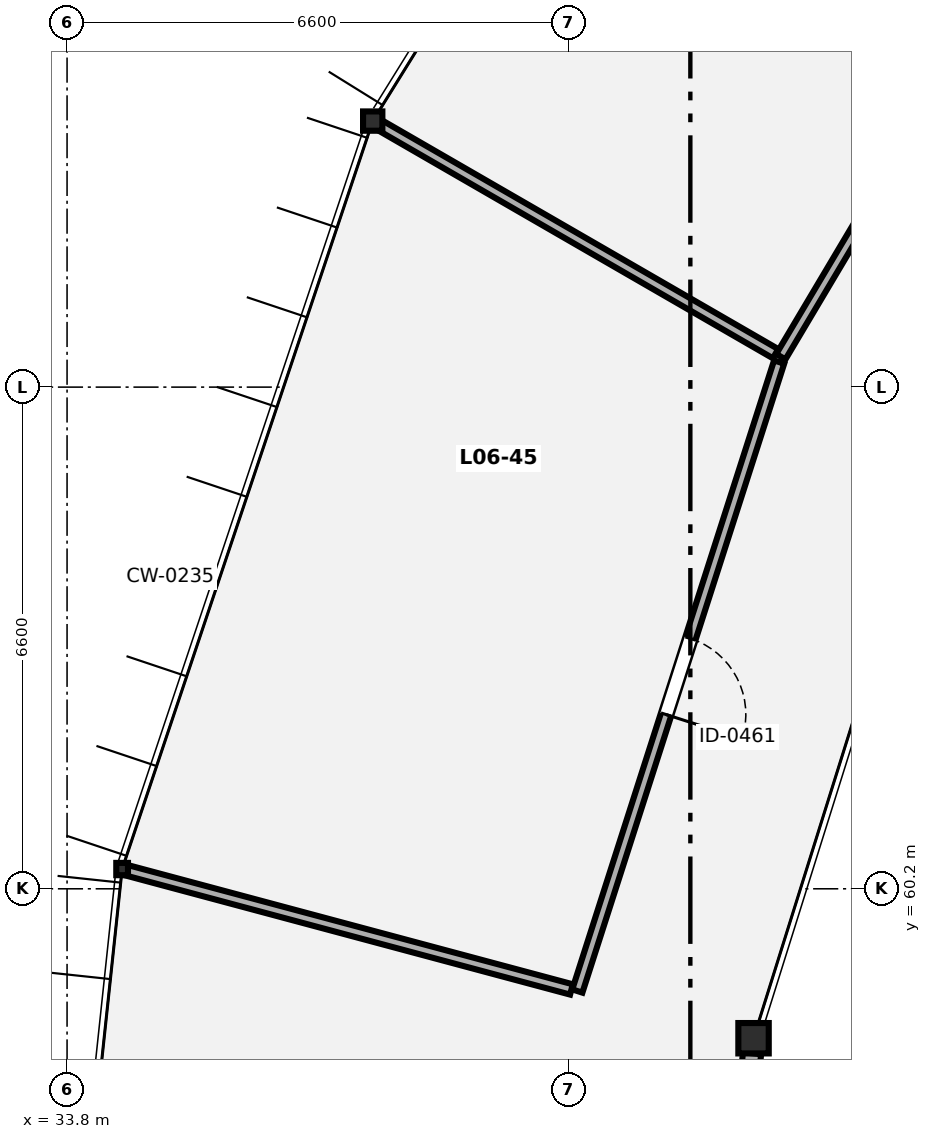
"""IFC4 building model, lengths in metres.
Left out: names, types, materials, properties, quantities, classifications, styles, units other than length and angle.
Written with IfcOpenShell. Run it as: python <this file> out.ifc"""

import sys

from ifc_helpers import new_model, si_unit, direction, frame, frame_2d, origin, origin_2d, place, context, subcontext, project, spatial, rectangle, i_section, extrude, element, fill, save


model = new_model("IFC4")
c1 = context("Model", 3, precision=1e-05, world=origin(), true_north=direction((0.0, 1.0)))
c2 = subcontext(c1, "Body", "Model", "MODEL_VIEW")
j1 = project(units=[si_unit("LENGTHUNIT", "METRE"), si_unit("PLANEANGLEUNIT", "RADIAN")], contexts=[c1])
p1 = place(None, origin())
s1 = spatial("IfcSite", under=j1, at=p1, CompositionType="ELEMENT")
p2 = place(p1, origin())
s2 = spatial("IfcBuilding", under=s1, at=p2, CompositionType="ELEMENT")
p3 = place(p2, frame((0.0, 0.0, 25.9)))
s3 = spatial("IfcBuildingStorey", under=s2, at=p3, CompositionType="ELEMENT", Elevation=25.9)
p4 = place(p3, frame((37.821, 70.3, 0.0), z_axis=(0.0, 0.0, 1.0), x_axis=(1.0, 0.0, 0.0)))
e1 = element("IfcColumn", 1, at=p4, inside=s3, PredefinedType="COLUMN", context=c2, shape_type="SweptSolid", body=[
    extrude(i_section(OverallWidth=0.254, OverallDepth=0.254, WebThickness=0.009, FlangeThickness=0.014, FilletRadius=0.014, at=origin_2d()), origin(), (0.0, 0.0, 1.0), 4.2),
])
p5 = place(p3, frame((34.524, 60.46, 0.0), z_axis=(0.0, 0.0, 1.0), x_axis=(1.0, 0.0, 0.0)))
e2 = element("IfcColumn", 2, at=p5, inside=s3, PredefinedType="COLUMN", context=c2, shape_type="SweptSolid", body=[
    extrude(i_section(OverallWidth=0.154, OverallDepth=0.162, WebThickness=0.008, FlangeThickness=0.011, FilletRadius=0.009, at=origin_2d()), origin(), (0.0, 0.0, 1.0), 4.2),
])
p6 = place(p3, frame((42.831, 58.234, 0.0), z_axis=(0.0, 0.0, 1.0), x_axis=(1.0, 0.0, 0.0)))
e3 = element("IfcColumn", 3, at=p6, inside=s3, PredefinedType="PILASTER", context=c2, shape_type="SweptSolid", body=[
    extrude(rectangle(XDim=0.4, YDim=0.4, at=origin_2d()), origin(), (0.0, 0.0, 1.0), 4.2),
])
p7 = place(p3, frame((42.812, 58.036, 0.0), z_axis=(0.0, 0.0, 1.0), x_axis=(-0.099255190182, -0.995062011747, 0.0)))
e4 = element("IfcWall", 4, at=p7, inside=s3, PredefinedType="SOLIDWALL", context=c2, shape_type="SweptSolid", body=[
    extrude(rectangle(XDim=8.073, YDim=0.24, at=frame_2d((4.036, 0.0))), origin(), (0.0, 0.0, 1.0), 3.6),
])
p8 = place(p7, frame((3.311, 0.0, 0.85)))
e5 = element("IfcOpeningElement", 5, at=p8, cuts=e4, PredefinedType="OPENING", context=c2, shape_type="SweptSolid", body=[
    extrude(rectangle(XDim=1.45, YDim=1.25, at=frame_2d((0.725, 0.625))), frame((0.0, 0.13, 0.0), z_axis=(0.0, -1.0, 0.0), x_axis=(1.0, 0.0, 0.0)), (0.0, 0.0, 1.0), 0.26),
])
p9 = place(p3, frame((47.448, 74.364, 0.0), z_axis=(0.0, 0.0, 1.0), x_axis=(-0.510915698067, -0.859630821614, 0.0)))
e6 = element("IfcWall", 6, at=p9, inside=s3, PredefinedType="PARTITIONING", context=c2, shape_type="SweptSolid", body=[
    extrude(rectangle(XDim=8.334, YDim=0.14, at=frame_2d((4.167, 0.0))), origin(), (0.0, 0.0, 1.0), 4.0),
])
p10 = place(p3, frame((43.121, 67.24, 0.0), z_axis=(0.0, 0.0, 1.0), x_axis=(-0.866010470582, 0.500025864173, 0.0)))
e7 = element("IfcWall", 7, at=p10, inside=s3, PredefinedType="PARTITIONING", context=c2, shape_type="SweptSolid", body=[
    extrude(rectangle(XDim=6.06, YDim=0.14, at=frame_2d((3.03, 0.0))), origin(), (0.0, 0.0, 1.0), 3.522),
])
p11 = place(p3, frame((43.168, 67.13, 0.0), z_axis=(0.0, 0.0, 1.0), x_axis=(-0.305487150125, -0.952196198852, 0.0)))
e8 = element("IfcWall", 8, at=p11, inside=s3, PredefinedType="PARTITIONING", context=c2, shape_type="SweptSolid", body=[
    extrude(rectangle(XDim=8.69, YDim=0.14, at=frame_2d((4.345, 0.0))), origin(), (0.0, 0.0, 1.0), 4.0),
])
p12 = place(p11, frame((3.82, 0.0, 0.0)))
e9 = element("IfcOpeningElement", 9, at=p12, cuts=e8, PredefinedType="OPENING", context=c2, shape_type="SweptSolid", body=[
    extrude(rectangle(XDim=1.05, YDim=2.15, at=frame_2d((0.525, 1.075))), frame((0.0, 0.08, 0.0), z_axis=(0.0, -1.0, 0.0), x_axis=(1.0, 0.0, 0.0)), (0.0, 0.0, 1.0), 0.16),
])
p13 = place(p3, frame((40.436, 58.876, 0.0), z_axis=(0.0, 0.0, 1.0), x_axis=(-0.965916578341, 0.258853556448, 0.0)))
e10 = element("IfcWall", 10, at=p13, inside=s3, PredefinedType="PARTITIONING", context=c2, shape_type="SweptSolid", body=[
    extrude(rectangle(XDim=6.06, YDim=0.14, at=frame_2d((3.03, 0.0))), origin(), (0.0, 0.0, 1.0), 3.522),
])
p14 = place(p12, origin())
e11 = element("IfcDoor", 11, at=p14, inside=s3, OperationType="SINGLE_SWING_RIGHT", PredefinedType="DOOR", context=c2, shape_type="SweptSolid", body=[
    extrude(rectangle(XDim=1.05, YDim=2.15, at=frame_2d((0.525, 1.075))), frame((0.0, 0.025, 0.0), z_axis=(0.0, -1.0, 0.0), x_axis=(1.0, 0.0, 0.0)), (0.0, 0.0, 1.0), 0.05),
])
fill(e9, e11)
save(model, sys.argv[1])
